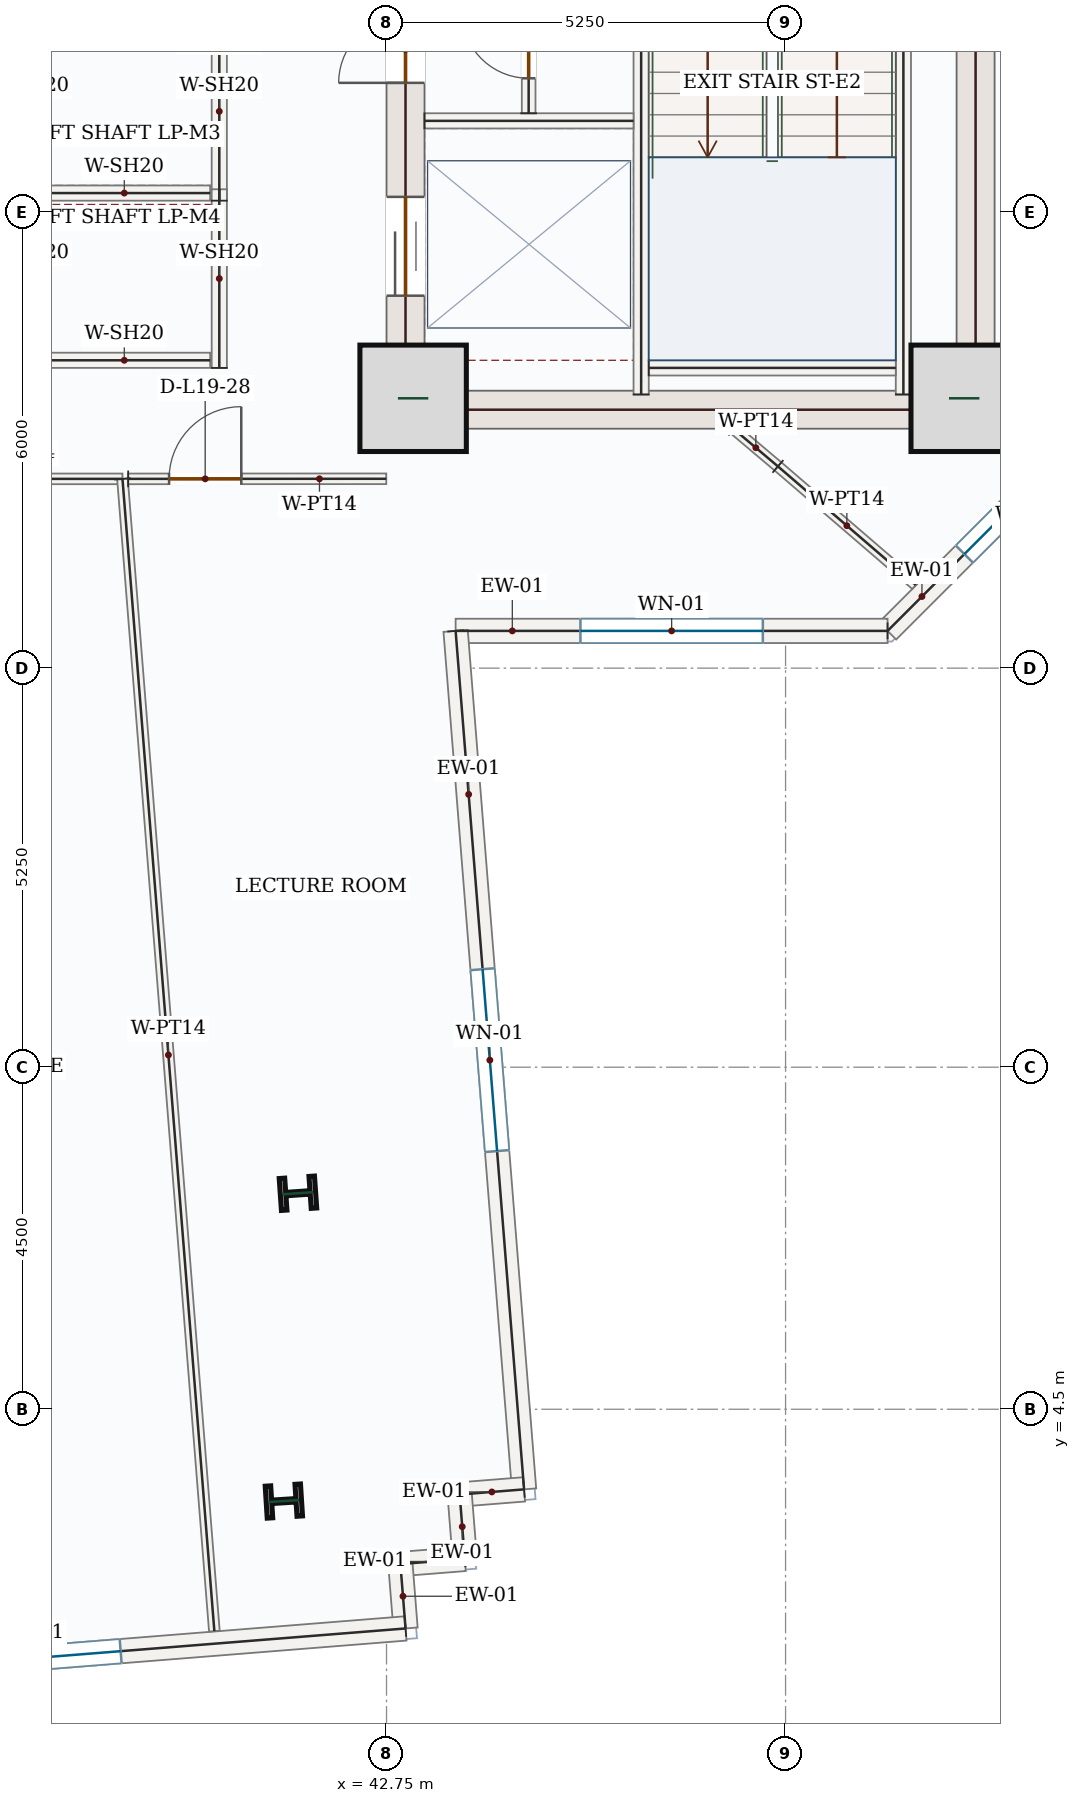
"""IFC4 building model, lengths in metres.
Left out: names, types, materials, properties, quantities, classifications, styles, units other than length and angle.
Written with IfcOpenShell. Run it as: python <this file> out.ifc"""

import sys

from ifc_helpers import new_model, si_unit, direction, frame, frame_2d, origin, origin_2d, place, context, subcontext, project, spatial, rectangle, i_section, extrude, source, transform, mapped, element, fill, save


model = new_model("IFC4")
c1 = context("Model", 3, precision=1e-05, world=origin(), true_north=direction((0.0, 1.0)))
c2 = subcontext(c1, "Body", "Model", "MODEL_VIEW")
j1 = project(units=[si_unit("LENGTHUNIT", "METRE"), si_unit("PLANEANGLEUNIT", "RADIAN")], contexts=[c1])
p1 = place(None, origin())
s1 = spatial("IfcSite", under=j1, at=p1, CompositionType="ELEMENT")
p2 = place(p1, origin())
s2 = spatial("IfcBuilding", under=s1, at=p2, CompositionType="ELEMENT")
p3 = place(p2, frame((0.0, 0.0, 87.9)))
s3 = spatial("IfcBuildingStorey", under=s2, at=p3, CompositionType="ELEMENT", Elevation=87.9)
p4 = place(p3, frame((43.0, 17.4, 0.0), z_axis=(0.0, 0.0, 1.0), x_axis=(0.0, 1.0, 0.0)))
e1 = element("IfcWall", 1, at=p4, inside=s3, PredefinedType="SHEAR", context=c2, shape_type="SweptSolid", body=[
    extrude(rectangle(XDim=8.55, YDim=0.5, at=frame_2d((4.275, 0.0))), origin(), (0.0, 0.0, 1.0), 3.95),
])
p5 = place(p4, frame((6.65, 0.0, 0.0)))
e2 = element("IfcOpeningElement", 2, at=p5, cuts=e1, PredefinedType="OPENING", context=c2, shape_type="SweptSolid", body=[
    extrude(rectangle(XDim=1.1, YDim=2.2, at=frame_2d((0.55, 1.1))), frame((0.0, 0.26, 0.0), z_axis=(0.0, -1.0, 0.0), x_axis=(1.0, 0.0, 0.0)), (0.0, 0.0, 1.0), 0.52),
])
p6 = place(p4, frame((1.75, 0.0, 0.0)))
e3 = element("IfcOpeningElement", 3, at=p6, cuts=e1, PredefinedType="OPENING", context=c2, shape_type="SweptSolid", body=[
    extrude(rectangle(XDim=1.3, YDim=2.2, at=frame_2d((0.65, 1.1))), frame((0.0, 0.26, 0.0), z_axis=(0.0, -1.0, 0.0), x_axis=(1.0, 0.0, 0.0)), (0.0, 0.0, 1.0), 0.52),
])
p7 = place(p4, frame((4.55, 0.0, 0.0)))
e4 = element("IfcOpeningElement", 4, at=p7, cuts=e1, PredefinedType="OPENING", context=c2, shape_type="SweptSolid", body=[
    extrude(rectangle(XDim=0.88, YDim=2.1, at=frame_2d((0.44, 1.05))), frame((0.0, 0.26, 0.0), z_axis=(0.0, -1.0, 0.0), x_axis=(1.0, 0.0, 0.0)), (0.0, 0.0, 1.0), 0.52),
])
m1 = source(origin(), c2, "Body", "SweptSolid", [
    extrude(rectangle(XDim=8.55, YDim=0.5, at=frame_2d((4.275, 0.0))), origin(), (0.0, 0.0, 1.0), 3.95),
])
p8 = place(p3, frame((50.5, 17.4, 0.0), z_axis=(0.0, 0.0, 1.0), x_axis=(0.0, 1.0, 0.0)))
e5 = element("IfcWall", 5, at=p8, inside=s3, PredefinedType="SHEAR", context=c2, shape_type="MappedRepresentation", body=[
    mapped(m1, transform((0.0, 0.0, 0.0), x_axis=(1.0, 0.0, 0.0), y_axis=(0.0, 1.0, 0.0), z_axis=(0.0, 0.0, 1.0), scale=1.0)),
])
m2 = source(origin(), c2, "Body", "SweptSolid", [
    extrude(rectangle(XDim=7.0, YDim=0.5, at=frame_2d((3.5, 0.0))), origin(), (0.0, 0.0, 1.0), 3.95),
])
p9 = place(p3, frame((43.25, 17.65, 0.0), z_axis=(0.0, 0.0, 1.0), x_axis=(1.0, 0.0, 0.0)))
e6 = element("IfcWall", 6, at=p9, inside=s3, PredefinedType="SHEAR", context=c2, shape_type="MappedRepresentation", body=[
    mapped(m2, transform((0.0, 0.0, 0.0), x_axis=(1.0, 0.0, 0.0), y_axis=(0.0, 1.0, 0.0), z_axis=(0.0, 0.0, 1.0), scale=1.0)),
])
m3 = source(origin(), c2, "Body", "SweptSolid", [
    extrude(rectangle(XDim=1.4, YDim=1.4, at=origin_2d()), origin(), (0.0, 0.0, 1.0), 4.2),
])
for number, where, z_axis, x_axis in (
    (7, (43.1, 17.8, 0.0), (0.0, 0.0, 1.0), (1.0, 0.0, 0.0)),
    (8, (50.35, 17.8, 0.0), (0.0, 0.0, 1.0), (1.0, 0.0, 0.0)),
):
    element("IfcColumn", number, at=place(p3, frame(where, z_axis=z_axis, x_axis=x_axis)), inside=s3, PredefinedType="COLUMN", context=c2, shape_type="MappedRepresentation", body=[
        mapped(m3, transform((0.0, 0.0, 0.0), x_axis=(1.0, 0.0, 0.0), y_axis=(0.0, 1.0, 0.0), z_axis=(0.0, 0.0, 1.0), scale=1.0)),
    ])
m4 = source(origin(), c2, "Body", "SweptSolid", [
    extrude(i_section(OverallWidth=0.421, OverallDepth=0.465, WebThickness=0.045, FlangeThickness=0.073, FilletRadius=0.018, at=origin_2d()), origin(), (0.0, 0.0, 1.0), 4.2),
])
for number, where, z_axis, x_axis in (
    (9, (41.585, 7.342, 0.0), (0.0, 0.0, 1.0), (-0.07, 0.998, 0.0)),
    (10, (41.399, 3.292, 0.0), (0.0, 0.0, 1.0), (-0.063, 0.998, 0.0)),
):
    element("IfcColumn", number, at=place(p3, frame(where, z_axis=z_axis, x_axis=x_axis)), inside=s3, PredefinedType="COLUMN", context=c2, shape_type="MappedRepresentation", body=[
        mapped(m4, transform((0.0, 0.0, 0.0), x_axis=(1.0, 0.0, 0.0), y_axis=(0.0, 1.0, 0.0), z_axis=(0.0, 0.0, 1.0), scale=1.0)),
    ])
p10 = place(p3, frame((53.06, 18.458, 0.0), z_axis=(0.0, 0.0, 1.0), x_axis=(-0.707106781187, -0.707106781187, 0.0)))
e11 = element("IfcWall", 11, at=p10, inside=s3, PredefinedType="SOLIDWALL", context=c2, shape_type="SweptSolid", body=[
    extrude(rectangle(XDim=5.258, YDim=0.32, at=frame_2d((2.629, 0.0))), origin(), (0.0, 0.0, 1.0), 3.95),
])
p11 = place(p10, frame((1.429, 0.0, 0.85)))
e12 = element("IfcOpeningElement", 12, at=p11, cuts=e11, PredefinedType="OPENING", context=c2, shape_type="SweptSolid", body=[
    extrude(rectangle(XDim=2.4, YDim=1.8, at=frame_2d((1.2, 0.9))), frame((0.0, 0.17, 0.0), z_axis=(0.0, -1.0, 0.0), x_axis=(1.0, 0.0, 0.0)), (0.0, 0.0, 1.0), 0.34),
])
p12 = place(p3, frame((49.342, 14.74, 0.0), z_axis=(0.0, 0.0, 1.0), x_axis=(-1.0, 0.0, 0.0)))
e13 = element("IfcWall", 13, at=p12, inside=s3, PredefinedType="SOLIDWALL", context=c2, shape_type="SweptSolid", body=[
    extrude(rectangle(XDim=5.683, YDim=0.32, at=frame_2d((2.842, 0.0))), origin(), (0.0, 0.0, 1.0), 3.95),
])
p13 = place(p12, frame((1.641, 0.0, 0.85)))
e14 = element("IfcOpeningElement", 14, at=p13, cuts=e13, PredefinedType="OPENING", context=c2, shape_type="SweptSolid", body=[
    extrude(rectangle(XDim=2.4, YDim=1.8, at=frame_2d((1.2, 0.9))), frame((0.0, 0.17, 0.0), z_axis=(0.0, -1.0, 0.0), x_axis=(1.0, 0.0, 0.0)), (0.0, 0.0, 1.0), 0.34),
])
p14 = place(p3, frame((43.659, 14.74, 0.0), z_axis=(0.0, 0.0, 1.0), x_axis=(0.079512268319, -0.996833887459, 0.0)))
e15 = element("IfcWall", 15, at=p14, inside=s3, PredefinedType="SOLIDWALL", context=c2, shape_type="SweptSolid", body=[
    extrude(rectangle(XDim=11.33, YDim=0.32, at=frame_2d((5.665, 0.0))), origin(), (0.0, 0.0, 1.0), 3.95),
])
p15 = place(p14, frame((4.465, 0.0, 0.85)))
e16 = element("IfcOpeningElement", 16, at=p15, cuts=e15, PredefinedType="OPENING", context=c2, shape_type="SweptSolid", body=[
    extrude(rectangle(XDim=2.4, YDim=1.8, at=frame_2d((1.2, 0.9))), frame((0.0, 0.17, 0.0), z_axis=(0.0, -1.0, 0.0), x_axis=(1.0, 0.0, 0.0)), (0.0, 0.0, 1.0), 0.34),
])
m5 = source(origin(), c2, "Body", "SweptSolid", [
    extrude(rectangle(XDim=0.85, YDim=0.32, at=frame_2d((0.425, 0.0))), origin(), (0.0, 0.0, 1.0), 3.95),
])
for number, where, z_axis, x_axis in (
    (17, (44.56, 3.446, 0.0), (0.0, 0.0, 1.0), (-0.997, -0.079, 0.0)),
    (18, (43.712, 3.378, 0.0), (0.0, 0.0, 1.0), (0.08, -0.997, 0.0)),
    (19, (43.78, 2.531, 0.0), (0.0, 0.0, 1.0), (-0.997, -0.08, 0.0)),
):
    element("IfcWall", number, at=place(p3, frame(where, z_axis=z_axis, x_axis=x_axis)), inside=s3, PredefinedType="SOLIDWALL", context=c2, shape_type="MappedRepresentation", body=[
        mapped(m5, transform((0.0, 0.0, 0.0), x_axis=(1.0, 0.0, 0.0), y_axis=(0.0, 1.0, 0.0), z_axis=(0.0, 0.0, 1.0), scale=1.0)),
    ])
m6 = source(origin(), c2, "Body", "SweptSolid", [
    extrude(rectangle(XDim=0.85, YDim=0.32, at=frame_2d((0.425, 0.0))), origin(), (0.0, 0.0, 1.0), 3.95),
])
p16 = place(p3, frame((42.933, 2.463, 0.0), z_axis=(0.0, 0.0, 1.0), x_axis=(0.079573954853, -0.996828965123, 0.0)))
e20 = element("IfcWall", 20, at=p16, inside=s3, PredefinedType="SOLIDWALL", context=c2, shape_type="MappedRepresentation", body=[
    mapped(m6, transform((0.0, 0.0, 0.0), x_axis=(1.0, 0.0, 0.0), y_axis=(0.0, 1.0, 0.0), z_axis=(0.0, 0.0, 1.0), scale=1.0)),
])
p17 = place(p3, frame((43.0, 1.616, 0.0), z_axis=(0.0, 0.0, 1.0), x_axis=(-0.996833485558, -0.079517306731, 0.0)))
e21 = element("IfcWall", 21, at=p17, inside=s3, PredefinedType="SOLIDWALL", context=c2, shape_type="SweptSolid", body=[
    extrude(rectangle(XDim=9.92, YDim=0.32, at=frame_2d((4.96, 0.0))), origin(), (0.0, 0.0, 1.0), 3.95),
])
p18 = place(p17, frame((3.76, 0.0, 0.85)))
e22 = element("IfcOpeningElement", 22, at=p18, cuts=e21, PredefinedType="OPENING", context=c2, shape_type="SweptSolid", body=[
    extrude(rectangle(XDim=2.4, YDim=1.8, at=frame_2d((1.2, 0.9))), frame((0.0, 0.17, 0.0), z_axis=(0.0, -1.0, 0.0), x_axis=(1.0, 0.0, 0.0)), (0.0, 0.0, 1.0), 0.34),
])
m7 = source(origin(), c2, "Body", "SweptSolid", [
    extrude(rectangle(XDim=7.87, YDim=0.2, at=frame_2d((3.935, 0.0))), origin(), (0.0, 0.0, 1.0), 3.95),
])
p19 = place(p3, frame((49.55, 17.85, 0.0), z_axis=(0.0, 0.0, 1.0), x_axis=(0.0, 1.0, 0.0)))
e23 = element("IfcWall", 23, at=p19, inside=s3, PredefinedType="SOLIDWALL", context=c2, shape_type="MappedRepresentation", body=[
    mapped(m7, transform((0.0, 0.0, 0.0), x_axis=(1.0, 0.0, 0.0), y_axis=(0.0, 1.0, 0.0), z_axis=(0.0, 0.0, 1.0), scale=1.0)),
])
p20 = place(p3, frame((46.1, 17.85, 0.0), z_axis=(0.0, 0.0, 1.0), x_axis=(0.0, 1.0, 0.0)))
e24 = element("IfcWall", 24, at=p20, inside=s3, PredefinedType="SOLIDWALL", context=c2, shape_type="SweptSolid", body=[
    extrude(rectangle(XDim=8.0, YDim=0.2, at=frame_2d((4.0, 0.0))), origin(), (0.0, 0.0, 1.0), 3.95),
])
p21 = place(p20, frame((6.3, 0.0, 0.0)))
e25 = element("IfcOpeningElement", 25, at=p21, cuts=e24, PredefinedType="OPENING", context=c2, shape_type="SweptSolid", body=[
    extrude(rectangle(XDim=1.05, YDim=2.15, at=frame_2d((0.525, 1.075))), frame((0.0, 0.11, 0.0), z_axis=(0.0, -1.0, 0.0), x_axis=(1.0, 0.0, 0.0)), (0.0, 0.0, 1.0), 0.22),
])
m8 = source(origin(), c2, "Body", "SweptSolid", [
    extrude(rectangle(XDim=3.25, YDim=0.2, at=frame_2d((1.625, 0.0))), origin(), (0.0, 0.0, 1.0), 3.95),
])
p22 = place(p3, frame((46.2, 18.2, 0.0), z_axis=(0.0, 0.0, 1.0), x_axis=(1.0, 0.0, 0.0)))
e26 = element("IfcWall", 26, at=p22, inside=s3, PredefinedType="SOLIDWALL", context=c2, shape_type="MappedRepresentation", body=[
    mapped(m8, transform((0.0, 0.0, 0.0), x_axis=(1.0, 0.0, 0.0), y_axis=(0.0, 1.0, 0.0), z_axis=(0.0, 0.0, 1.0), scale=1.0)),
])
m9 = source(origin(), c2, "Body", "SweptSolid", [
    extrude(rectangle(XDim=2.75, YDim=0.2, at=frame_2d((1.375, 0.0))), origin(), (0.0, 0.0, 1.0), 3.95),
])
p23 = place(p3, frame((43.25, 21.45, 0.0), z_axis=(0.0, 0.0, 1.0), x_axis=(1.0, 0.0, 0.0)))
e27 = element("IfcWall", 27, at=p23, inside=s3, PredefinedType="SOLIDWALL", context=c2, shape_type="MappedRepresentation", body=[
    mapped(m9, transform((0.0, 0.0, 0.0), x_axis=(1.0, 0.0, 0.0), y_axis=(0.0, 1.0, 0.0), z_axis=(0.0, 0.0, 1.0), scale=1.0)),
])
p24 = place(p3, frame((44.62, 21.55, 0.0), z_axis=(0.0, 0.0, 1.0), x_axis=(0.0, 1.0, 0.0)))
e28 = element("IfcWall", 28, at=p24, inside=s3, PredefinedType="PARTITIONING", context=c2, shape_type="SweptSolid", body=[
    extrude(rectangle(XDim=1.8, YDim=0.18, at=frame_2d((0.9, 0.0))), origin(), (0.0, 0.0, 1.0), 3.95),
])
p25 = place(p24, frame((0.46, 0.0, 0.0)))
e29 = element("IfcOpeningElement", 29, at=p25, cuts=e28, PredefinedType="OPENING", context=c2, shape_type="SweptSolid", body=[
    extrude(rectangle(XDim=0.88, YDim=2.1, at=frame_2d((0.44, 1.05))), frame((0.0, 0.1, 0.0), z_axis=(0.0, -1.0, 0.0), x_axis=(1.0, 0.0, 0.0)), (0.0, 0.0, 1.0), 0.2),
])
m10 = source(origin(), c2, "Body", "SweptSolid", [
    extrude(rectangle(XDim=2.35, YDim=0.2, at=frame_2d((1.175, 0.0))), origin(), (0.0, 0.0, 1.0), 3.95),
])
p26 = place(p3, frame((40.55, 20.4, 0.0), z_axis=(0.0, 0.0, 1.0), x_axis=(0.0, 1.0, 0.0)))
e30 = element("IfcWall", 30, at=p26, inside=s3, PredefinedType="SOLIDWALL", context=c2, shape_type="MappedRepresentation", body=[
    mapped(m10, transform((0.0, 0.0, 0.0), x_axis=(1.0, 0.0, 0.0), y_axis=(0.0, 1.0, 0.0), z_axis=(0.0, 0.0, 1.0), scale=1.0)),
])
m11 = source(origin(), c2, "Body", "SweptSolid", [
    extrude(rectangle(XDim=2.26, YDim=0.2, at=frame_2d((1.13, 0.0))), origin(), (0.0, 0.0, 1.0), 3.95),
])
p27 = place(p3, frame((38.17, 20.5, 0.0), z_axis=(0.0, 0.0, 1.0), x_axis=(1.0, 0.0, 0.0)))
e31 = element("IfcWall", 31, at=p27, inside=s3, PredefinedType="SOLIDWALL", context=c2, shape_type="MappedRepresentation", body=[
    mapped(m11, transform((0.0, 0.0, 0.0), x_axis=(1.0, 0.0, 0.0), y_axis=(0.0, 1.0, 0.0), z_axis=(0.0, 0.0, 1.0), scale=1.0)),
])
p28 = place(p3, frame((40.55, 18.2, 0.0), z_axis=(0.0, 0.0, 1.0), x_axis=(0.0, 1.0, 0.0)))
e32 = element("IfcWall", 32, at=p28, inside=s3, PredefinedType="SOLIDWALL", context=c2, shape_type="MappedRepresentation", body=[
    mapped(m10, transform((0.0, 0.0, 0.0), x_axis=(1.0, 0.0, 0.0), y_axis=(0.0, 1.0, 0.0), z_axis=(0.0, 0.0, 1.0), scale=1.0)),
])
p29 = place(p3, frame((38.17, 18.3, 0.0), z_axis=(0.0, 0.0, 1.0), x_axis=(1.0, 0.0, 0.0)))
e33 = element("IfcWall", 33, at=p29, inside=s3, PredefinedType="SOLIDWALL", context=c2, shape_type="MappedRepresentation", body=[
    mapped(m11, transform((0.0, 0.0, 0.0), x_axis=(1.0, 0.0, 0.0), y_axis=(0.0, 1.0, 0.0), z_axis=(0.0, 0.0, 1.0), scale=1.0)),
])
p30 = place(p3, frame((34.616, 16.74, 0.0), z_axis=(0.0, 0.0, 1.0), x_axis=(1.0, 0.0, 0.0)))
e34 = element("IfcWall", 34, at=p30, inside=s3, PredefinedType="PARTITIONING", context=c2, shape_type="SweptSolid", body=[
    extrude(rectangle(XDim=4.66, YDim=0.14, at=frame_2d((2.33, 0.0))), origin(), (0.0, 0.0, 1.0), 3.95),
])
p31 = place(p30, frame((0.816, 0.0, 0.0)))
e35 = element("IfcOpeningElement", 35, at=p31, cuts=e34, PredefinedType="OPENING", context=c2, shape_type="SweptSolid", body=[
    extrude(rectangle(XDim=0.95, YDim=2.15, at=frame_2d((0.475, 1.075))), frame((0.0, 0.08, 0.0), z_axis=(0.0, -1.0, 0.0), x_axis=(1.0, 0.0, 0.0)), (0.0, 0.0, 1.0), 0.16),
])
m12 = source(origin(), c2, "Body", "SweptSolid", [
    extrude(rectangle(XDim=15.207, YDim=0.14, at=frame_2d((7.604, 0.0))), origin(), (0.0, 0.0, 1.0), 3.95),
])
p32 = place(p3, frame((39.276, 16.74, 0.0), z_axis=(0.0, 0.0, 1.0), x_axis=(0.07950146843, -0.996834748851, 0.0)))
e36 = element("IfcWall", 36, at=p32, inside=s3, PredefinedType="PARTITIONING", context=c2, shape_type="MappedRepresentation", body=[
    mapped(m12, transform((0.0, 0.0, 0.0), x_axis=(1.0, 0.0, 0.0), y_axis=(0.0, 1.0, 0.0), z_axis=(0.0, 0.0, 1.0), scale=1.0)),
])
p33 = place(p3, frame((39.351, 16.74, 0.0), z_axis=(0.0, 0.0, 1.0), x_axis=(0.999999935369, 0.000359531148, 0.0)))
e37 = element("IfcWall", 37, at=p33, inside=s3, PredefinedType="PARTITIONING", context=c2, shape_type="SweptSolid", body=[
    extrude(rectangle(XDim=3.395, YDim=0.14, at=frame_2d((1.698, 0.0))), origin(), (0.0, 0.0, 1.0), 3.95),
])
p34 = place(p33, frame((0.538, 0.0, 0.0)))
e38 = element("IfcOpeningElement", 38, at=p34, cuts=e37, PredefinedType="OPENING", context=c2, shape_type="SweptSolid", body=[
    extrude(rectangle(XDim=0.95, YDim=2.15, at=frame_2d((0.475, 1.075))), frame((0.0, 0.08, 0.0), z_axis=(0.0, -1.0, 0.0), x_axis=(1.0, 0.0, 0.0)), (0.0, 0.0, 1.0), 0.16),
])
m13 = source(origin(), c2, "Body", "SweptSolid", [
    extrude(rectangle(XDim=0.761, YDim=0.14, at=frame_2d((0.38, 0.0))), origin(), (0.0, 0.0, 1.0), 3.95),
])
p35 = place(p3, frame((47.318, 17.395, 0.0), z_axis=(0.0, 0.0, 1.0), x_axis=(0.764128340752, -0.645064243978, 0.0)))
e39 = element("IfcWall", 39, at=p35, inside=s3, PredefinedType="PARTITIONING", context=c2, shape_type="MappedRepresentation", body=[
    mapped(m13, transform((0.0, 0.0, 0.0), x_axis=(1.0, 0.0, 0.0), y_axis=(0.0, 1.0, 0.0), z_axis=(0.0, 0.0, 1.0), scale=1.0)),
])
m14 = source(origin(), c2, "Body", "SweptSolid", [
    extrude(rectangle(XDim=2.392, YDim=0.14, at=frame_2d((1.196, 0.0))), origin(), (0.0, 0.0, 1.0), 3.95),
])
p36 = place(p3, frame((47.9, 16.904, 0.0), z_axis=(0.0, 0.0, 1.0), x_axis=(0.758044905356, -0.652202362357, 0.0)))
e40 = element("IfcWall", 40, at=p36, inside=s3, PredefinedType="PARTITIONING", context=c2, shape_type="MappedRepresentation", body=[
    mapped(m14, transform((0.0, 0.0, 0.0), x_axis=(1.0, 0.0, 0.0), y_axis=(0.0, 1.0, 0.0), z_axis=(0.0, 0.0, 1.0), scale=1.0)),
])
m15 = source(origin(), c2, "Body", "SweptSolid", [
    extrude(rectangle(XDim=2.4, YDim=1.8, at=frame_2d((1.2, 0.9))), frame((0.0, 0.03, 0.0), z_axis=(0.0, -1.0, 0.0), x_axis=(1.0, 0.0, 0.0)), (0.0, 0.0, 1.0), 0.06),
])
p37 = place(p11, origin())
e41 = element("IfcWindow", 41, at=p37, inside=s3, PartitioningType="DOUBLE_PANEL_VERTICAL", PredefinedType="WINDOW", context=c2, shape_type="MappedRepresentation", body=[
    mapped(m15, transform((0.0, 0.0, 0.0), x_axis=(1.0, 0.0, 0.0), y_axis=(0.0, 1.0, 0.0), z_axis=(0.0, 0.0, 1.0), scale=1.0)),
])
fill(e12, e41)
p38 = place(p13, origin())
e42 = element("IfcWindow", 42, at=p38, inside=s3, PartitioningType="DOUBLE_PANEL_VERTICAL", PredefinedType="WINDOW", context=c2, shape_type="MappedRepresentation", body=[
    mapped(m15, transform((0.0, 0.0, 0.0), x_axis=(1.0, 0.0, 0.0), y_axis=(0.0, 1.0, 0.0), z_axis=(0.0, 0.0, 1.0), scale=1.0)),
])
fill(e14, e42)
p39 = place(p15, origin())
e43 = element("IfcWindow", 43, at=p39, inside=s3, PartitioningType="DOUBLE_PANEL_VERTICAL", PredefinedType="WINDOW", context=c2, shape_type="MappedRepresentation", body=[
    mapped(m15, transform((0.0, 0.0, 0.0), x_axis=(1.0, 0.0, 0.0), y_axis=(0.0, 1.0, 0.0), z_axis=(0.0, 0.0, 1.0), scale=1.0)),
])
fill(e16, e43)
p40 = place(p18, origin())
e44 = element("IfcWindow", 44, at=p40, inside=s3, PartitioningType="DOUBLE_PANEL_VERTICAL", PredefinedType="WINDOW", context=c2, shape_type="MappedRepresentation", body=[
    mapped(m15, transform((0.0, 0.0, 0.0), x_axis=(1.0, 0.0, 0.0), y_axis=(0.0, 1.0, 0.0), z_axis=(0.0, 0.0, 1.0), scale=1.0)),
])
fill(e22, e44)
m16 = source(origin(), c2, "Body", "SweptSolid", [
    extrude(rectangle(XDim=1.3, YDim=2.2, at=frame_2d((0.65, 1.1))), frame((0.0, 0.025, 0.0), z_axis=(0.0, -1.0, 0.0), x_axis=(1.0, 0.0, 0.0)), (0.0, 0.0, 1.0), 0.05),
])
p41 = place(p6, origin())
e45 = element("IfcDoor", 45, at=p41, inside=s3, OperationType="DOUBLE_DOOR_SLIDING", PredefinedType="DOOR", context=c2, shape_type="MappedRepresentation", body=[
    mapped(m16, transform((0.0, 0.0, 0.0), x_axis=(1.0, 0.0, 0.0), y_axis=(0.0, 1.0, 0.0), z_axis=(0.0, 0.0, 1.0), scale=1.0)),
])
fill(e3, e45)
m17 = source(origin(), c2, "Body", "SweptSolid", [
    extrude(rectangle(XDim=0.88, YDim=2.1, at=frame_2d((0.44, 1.05))), frame((0.0, 0.025, 0.0), z_axis=(0.0, -1.0, 0.0), x_axis=(1.0, 0.0, 0.0)), (0.0, 0.0, 1.0), 0.05),
])
p42 = place(p7, origin())
e46 = element("IfcDoor", 46, at=p42, inside=s3, OperationType="SINGLE_SWING_LEFT", PredefinedType="DOOR", context=c2, shape_type="MappedRepresentation", body=[
    mapped(m17, transform((0.0, 0.0, 0.0), x_axis=(1.0, 0.0, 0.0), y_axis=(0.0, 1.0, 0.0), z_axis=(0.0, 0.0, 1.0), scale=1.0)),
])
fill(e4, e46)
p43 = place(p25, origin())
e47 = element("IfcDoor", 47, at=p43, inside=s3, OperationType="SINGLE_SWING_RIGHT", PredefinedType="DOOR", context=c2, shape_type="MappedRepresentation", body=[
    mapped(m17, transform((0.0, 0.0, 0.0), x_axis=(1.0, 0.0, 0.0), y_axis=(0.0, 1.0, 0.0), z_axis=(0.0, 0.0, 1.0), scale=1.0)),
])
fill(e29, e47)
m18 = source(origin(), c2, "Body", "SweptSolid", [
    extrude(rectangle(XDim=0.95, YDim=2.15, at=frame_2d((0.475, 1.075))), frame((0.0, 0.025, 0.0), z_axis=(0.0, -1.0, 0.0), x_axis=(1.0, 0.0, 0.0)), (0.0, 0.0, 1.0), 0.05),
])
p44 = place(p34, origin())
e48 = element("IfcDoor", 48, at=p44, inside=s3, OperationType="SINGLE_SWING_RIGHT", PredefinedType="DOOR", context=c2, shape_type="MappedRepresentation", body=[
    mapped(m18, transform((0.0, 0.0, 0.0), x_axis=(1.0, 0.0, 0.0), y_axis=(0.0, 1.0, 0.0), z_axis=(0.0, 0.0, 1.0), scale=1.0)),
])
fill(e38, e48)
save(model, sys.argv[1])
